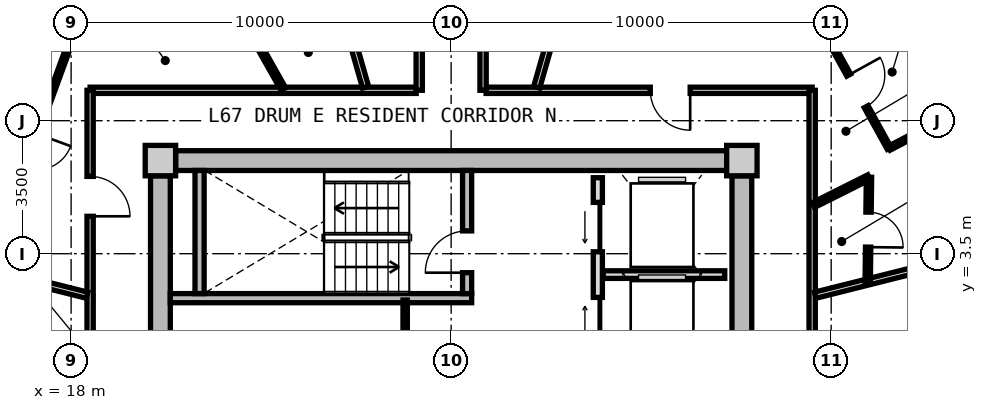
"""IFC4 building model, lengths in metres.
Left out: names, types, materials, properties, quantities, classifications, styles, units other than length and angle.
Written with IfcOpenShell. Run it as: python <this file> out.ifc"""

import sys

from ifc_helpers import new_model, si_unit, direction, frame, frame_2d, origin, origin_2d, place, context, subcontext, project, spatial, rectangle, extrude, source, transform, mapped, element, fill, save


model = new_model("IFC4")
c1 = context("Model", 3, precision=1e-05, world=origin(), true_north=direction((0.0, 1.0)))
c2 = subcontext(c1, "Body", "Model", "MODEL_VIEW")
j1 = project(units=[si_unit("LENGTHUNIT", "METRE"), si_unit("PLANEANGLEUNIT", "RADIAN")], contexts=[c1])
p1 = place(None, origin())
s1 = spatial("IfcSite", under=j1, at=p1, CompositionType="ELEMENT")
p2 = place(p1, origin())
s2 = spatial("IfcBuilding", under=s1, at=p2, CompositionType="ELEMENT")
p3 = place(p2, frame((0.0, 0.0, 216.95)))
s3 = spatial("IfcBuildingStorey", under=s2, at=p3, CompositionType="ELEMENT", Elevation=216.95)
m1 = source(origin(), c2, "Body", "SweptSolid", [
    extrude(rectangle(XDim=0.8, YDim=0.8, at=origin_2d()), origin(), (0.0, 0.0, 1.0), 3.05),
])
for number, where, z_axis, x_axis in (
    (1, (35.65, 5.95, 0.0), (0.0, 0.0, 1.0), (1.0, 0.0, 0.0)),
    (2, (20.35, 5.95, 0.0), (0.0, 0.0, 1.0), (1.0, 0.0, 0.0)),
):
    element("IfcColumn", number, at=place(p3, frame(where, z_axis=z_axis, x_axis=x_axis)), inside=s3, PredefinedType="COLUMN", context=c2, shape_type="MappedRepresentation", body=[
        mapped(m1, transform((0.0, 0.0, 0.0), x_axis=(1.0, 0.0, 0.0), y_axis=(0.0, 1.0, 0.0), z_axis=(0.0, 0.0, 1.0), scale=1.0)),
    ])
m2 = source(origin(), c2, "Body", "SweptSolid", [
    extrude(rectangle(XDim=14.5, YDim=0.52, at=frame_2d((7.25, 0.0))), origin(), (0.0, 0.0, 1.0), 2.76),
])
p4 = place(p3, frame((20.75, 5.95, 0.0), z_axis=(0.0, 0.0, 1.0), x_axis=(1.0, 0.0, 0.0)))
e3 = element("IfcWall", 3, at=p4, inside=s3, PredefinedType="SHEAR", context=c2, shape_type="MappedRepresentation", body=[
    mapped(m2, transform((0.0, 0.0, 0.0), x_axis=(1.0, 0.0, 0.0), y_axis=(0.0, 1.0, 0.0), z_axis=(0.0, 0.0, 1.0), scale=1.0)),
])
m3 = source(origin(), c2, "Body", "SweptSolid", [
    extrude(rectangle(XDim=11.1, YDim=0.52, at=frame_2d((5.55, 0.0))), origin(), (0.0, 0.0, 1.0), 2.76),
])
p5 = place(p3, frame((20.35, -5.55, 0.0), z_axis=(0.0, 0.0, 1.0), x_axis=(0.0, 1.0, 0.0)))
e4 = element("IfcWall", 4, at=p5, inside=s3, PredefinedType="SHEAR", context=c2, shape_type="MappedRepresentation", body=[
    mapped(m3, transform((0.0, 0.0, 0.0), x_axis=(1.0, 0.0, 0.0), y_axis=(0.0, 1.0, 0.0), z_axis=(0.0, 0.0, 1.0), scale=1.0)),
])
p6 = place(p5, frame((3.8, 0.0, 0.0)))
e5 = element("IfcOpeningElement", 5, at=p6, cuts=e4, PredefinedType="OPENING", context=c2, shape_type="SweptSolid", body=[
    extrude(rectangle(XDim=1.2, YDim=2.15, at=frame_2d((0.6, 1.075))), frame((0.0, 0.27, 0.0), z_axis=(0.0, -1.0, 0.0), x_axis=(1.0, 0.0, 0.0)), (0.0, 0.0, 1.0), 0.54),
])
p7 = place(p3, frame((35.65, 5.55, 0.0), z_axis=(0.0, 0.0, 1.0), x_axis=(0.0, -1.0, 0.0)))
e6 = element("IfcWall", 6, at=p7, inside=s3, PredefinedType="SHEAR", context=c2, shape_type="MappedRepresentation", body=[
    mapped(m3, transform((0.0, 0.0, 0.0), x_axis=(1.0, 0.0, 0.0), y_axis=(0.0, 1.0, 0.0), z_axis=(0.0, 0.0, 1.0), scale=1.0)),
])
p8 = place(p7, frame((5.65, 0.0, 0.0)))
e7 = element("IfcOpeningElement", 7, at=p8, cuts=e6, PredefinedType="OPENING", context=c2, shape_type="SweptSolid", body=[
    extrude(rectangle(XDim=1.2, YDim=2.15, at=frame_2d((0.6, 1.075))), frame((0.0, 0.27, 0.0), z_axis=(0.0, -1.0, 0.0), x_axis=(1.0, 0.0, 0.0)), (0.0, 0.0, 1.0), 0.54),
])
m4 = source(origin(), c2, "Body", "SweptSolid", [
    extrude(rectangle(XDim=7.93, YDim=0.24, at=frame_2d((3.965, 0.0))), origin(), (0.0, 0.0, 1.0), 2.76),
])
p9 = place(p3, frame((20.61, 2.33, 0.0), z_axis=(0.0, 0.0, 1.0), x_axis=(1.0, 0.0, 0.0)))
e8 = element("IfcWall", 8, at=p9, inside=s3, PredefinedType="PARTITIONING", context=c2, shape_type="MappedRepresentation", body=[
    mapped(m4, transform((0.0, 0.0, 0.0), x_axis=(1.0, 0.0, 0.0), y_axis=(0.0, 1.0, 0.0), z_axis=(0.0, 0.0, 1.0), scale=1.0)),
])
m5 = source(origin(), c2, "Body", "SweptSolid", [
    extrude(rectangle(XDim=3.24, YDim=0.24, at=frame_2d((1.62, 0.0))), origin(), (0.0, 0.0, 1.0), 2.76),
])
p10 = place(p3, frame((21.38, 2.45, 0.0), z_axis=(0.0, 0.0, 1.0), x_axis=(0.0, 1.0, 0.0)))
e9 = element("IfcWall", 9, at=p10, inside=s3, PredefinedType="PARTITIONING", context=c2, shape_type="MappedRepresentation", body=[
    mapped(m5, transform((0.0, 0.0, 0.0), x_axis=(1.0, 0.0, 0.0), y_axis=(0.0, 1.0, 0.0), z_axis=(0.0, 0.0, 1.0), scale=1.0)),
])
p11 = place(p3, frame((28.42, 2.45, 0.0), z_axis=(0.0, 0.0, 1.0), x_axis=(0.0, 1.0, 0.0)))
e10 = element("IfcWall", 10, at=p11, inside=s3, PredefinedType="PARTITIONING", context=c2, shape_type="MappedRepresentation", body=[
    mapped(m5, transform((0.0, 0.0, 0.0), x_axis=(1.0, 0.0, 0.0), y_axis=(0.0, 1.0, 0.0), z_axis=(0.0, 0.0, 1.0), scale=1.0)),
])
p12 = place(p11, frame((0.55, 0.0, 0.0)))
e11 = element("IfcOpeningElement", 11, at=p12, cuts=e10, PredefinedType="OPENING", context=c2, shape_type="SweptSolid", body=[
    extrude(rectangle(XDim=1.1, YDim=2.15, at=frame_2d((0.55, 1.075))), frame((0.0, 0.13, 0.0), z_axis=(0.0, -1.0, 0.0), x_axis=(1.0, 0.0, 0.0)), (0.0, 0.0, 1.0), 0.26),
])
m6 = source(origin(), c2, "Body", "SweptSolid", [
    extrude(rectangle(XDim=5.0, YDim=0.24, at=frame_2d((2.5, 0.0))), origin(), (0.0, 0.0, 1.0), 2.745),
])
p13 = place(p3, frame((31.86, 0.5, 0.0), z_axis=(0.0, 0.0, 1.0), x_axis=(0.0, 1.0, 0.0)))
e12 = element("IfcWall", 12, at=p13, inside=s3, PredefinedType="PARTITIONING", context=c2, shape_type="MappedRepresentation", body=[
    mapped(m6, transform((0.0, 0.0, 0.0), x_axis=(1.0, 0.0, 0.0), y_axis=(0.0, 1.0, 0.0), z_axis=(0.0, 0.0, 1.0), scale=1.0)),
])
p14 = place(p13, frame((3.05, 0.0, 0.0)))
e13 = element("IfcOpeningElement", 13, at=p14, cuts=e12, PredefinedType="OPENING", context=c2, shape_type="SweptSolid", body=[
    extrude(rectangle(XDim=1.3, YDim=2.2, at=frame_2d((0.65, 1.1))), frame((0.0, 0.13, 0.0), z_axis=(0.0, -1.0, 0.0), x_axis=(1.0, 0.0, 0.0)), (0.0, 0.0, 1.0), 0.26),
])
p15 = place(p13, frame((0.55, 0.0, 0.0)))
e14 = element("IfcOpeningElement", 14, at=p15, cuts=e12, PredefinedType="OPENING", context=c2, shape_type="SweptSolid", body=[
    extrude(rectangle(XDim=1.3, YDim=2.2, at=frame_2d((0.65, 1.1))), frame((0.0, 0.13, 0.0), z_axis=(0.0, -1.0, 0.0), x_axis=(1.0, 0.0, 0.0)), (0.0, 0.0, 1.0), 0.26),
])
m7 = source(origin(), c2, "Body", "SweptSolid", [
    extrude(rectangle(XDim=3.2, YDim=0.2, at=frame_2d((1.6, 0.0))), origin(), (0.0, 0.0, 1.0), 2.745),
])
p16 = place(p3, frame((32.0, 2.95, 0.0), z_axis=(0.0, 0.0, 1.0), x_axis=(1.0, 0.0, 0.0)))
e15 = element("IfcWall", 15, at=p16, inside=s3, PredefinedType="PARTITIONING", context=c2, shape_type="MappedRepresentation", body=[
    mapped(m7, transform((0.0, 0.0, 0.0), x_axis=(1.0, 0.0, 0.0), y_axis=(0.0, 1.0, 0.0), z_axis=(0.0, 0.0, 1.0), scale=1.0)),
])
m8 = source(origin(), c2, "Body", "SweptSolid", [
    extrude(rectangle(XDim=2.33, YDim=0.115, at=frame_2d((1.165, 0.0))), origin(), (0.0, 0.0, 1.0), 2.745),
])
p17 = place(p3, frame((26.79, -0.05, 0.0), z_axis=(0.0, 0.0, 1.0), x_axis=(0.0, 1.0, 0.0)))
e16 = element("IfcWall", 16, at=p17, inside=s3, PredefinedType="PARTITIONING", context=c2, shape_type="MappedRepresentation", body=[
    mapped(m8, transform((0.0, 0.0, 0.0), x_axis=(1.0, 0.0, 0.0), y_axis=(0.0, 1.0, 0.0), z_axis=(0.0, 0.0, 1.0), scale=1.0)),
])
m9 = source(origin(), c2, "Body", "SweptSolid", [
    extrude(rectangle(XDim=8.58, YDim=0.165, at=frame_2d((4.29, 0.0))), origin(), (0.0, 0.0, 1.0), 2.745),
])
p18 = place(p3, frame((18.5, 7.8, 0.0), z_axis=(0.0, 0.0, 1.0), x_axis=(1.0, 0.0, 0.0)))
e17 = element("IfcWall", 17, at=p18, inside=s3, PredefinedType="PARTITIONING", context=c2, shape_type="MappedRepresentation", body=[
    mapped(m9, transform((0.0, 0.0, 0.0), x_axis=(1.0, 0.0, 0.0), y_axis=(0.0, 1.0, 0.0), z_axis=(0.0, 0.0, 1.0), scale=1.0)),
])
p19 = place(p3, frame((28.92, 7.8, 0.0), z_axis=(0.0, 0.0, 1.0), x_axis=(1.0, 0.0, 0.0)))
e18 = element("IfcWall", 18, at=p19, inside=s3, PredefinedType="PARTITIONING", context=c2, shape_type="MappedRepresentation", body=[
    mapped(m9, transform((0.0, 0.0, 0.0), x_axis=(1.0, 0.0, 0.0), y_axis=(0.0, 1.0, 0.0), z_axis=(0.0, 0.0, 1.0), scale=1.0)),
])
p20 = place(p19, frame((4.32, 0.0, 0.0)))
e19 = element("IfcOpeningElement", 19, at=p20, cuts=e18, PredefinedType="OPENING", context=c2, shape_type="SweptSolid", body=[
    extrude(rectangle(XDim=1.05, YDim=2.15, at=frame_2d((0.525, 1.075))), frame((0.0, 0.093, 0.0), z_axis=(0.0, -1.0, 0.0), x_axis=(1.0, 0.0, 0.0)), (0.0, 0.0, 1.0), 0.185),
])
m10 = source(origin(), c2, "Body", "SweptSolid", [
    extrude(rectangle(XDim=6.88, YDim=0.165, at=frame_2d((3.44, 0.0))), origin(), (0.0, 0.0, 1.0), 2.745),
])
p21 = place(p3, frame((18.5, 0.92, 0.0), z_axis=(0.0, 0.0, 1.0), x_axis=(0.0, 1.0, 0.0)))
e20 = element("IfcWall", 20, at=p21, inside=s3, PredefinedType="PARTITIONING", context=c2, shape_type="MappedRepresentation", body=[
    mapped(m10, transform((0.0, 0.0, 0.0), x_axis=(1.0, 0.0, 0.0), y_axis=(0.0, 1.0, 0.0), z_axis=(0.0, 0.0, 1.0), scale=1.0)),
])
p22 = place(p21, frame((3.564, 0.0, 0.0)))
e21 = element("IfcOpeningElement", 21, at=p22, cuts=e20, PredefinedType="OPENING", context=c2, shape_type="SweptSolid", body=[
    extrude(rectangle(XDim=1.05, YDim=2.15, at=frame_2d((0.525, 1.075))), frame((0.0, 0.093, 0.0), z_axis=(0.0, -1.0, 0.0), x_axis=(1.0, 0.0, 0.0)), (0.0, 0.0, 1.0), 0.185),
])
p23 = place(p3, frame((37.5, 7.8, 0.0), z_axis=(0.0, 0.0, 1.0), x_axis=(0.0, -1.0, 0.0)))
e22 = element("IfcWall", 22, at=p23, inside=s3, PredefinedType="PARTITIONING", context=c2, shape_type="MappedRepresentation", body=[
    mapped(m10, transform((0.0, 0.0, 0.0), x_axis=(1.0, 0.0, 0.0), y_axis=(0.0, 1.0, 0.0), z_axis=(0.0, 0.0, 1.0), scale=1.0)),
])
m11 = source(origin(), c2, "Body", "SweptSolid", [
    extrude(rectangle(XDim=6.974, YDim=0.165, at=frame_2d((3.487, 0.0))), origin(), (0.0, 0.0, 1.0), 2.345),
])
for number, where, z_axis, x_axis in (
    (23, (30.251, 7.88, 0.0), (0.0, 0.0, 1.0), (0.275, 0.962, 0.0)),
    (24, (25.749, 7.88, 0.0), (0.0, 0.0, 1.0), (-0.275, 0.962, 0.0)),
):
    element("IfcWall", number, at=place(p3, frame(where, z_axis=z_axis, x_axis=x_axis)), inside=s3, PredefinedType="PARTITIONING", context=c2, shape_type="MappedRepresentation", body=[
        mapped(m11, transform((0.0, 0.0, 0.0), x_axis=(1.0, 0.0, 0.0), y_axis=(0.0, 1.0, 0.0), z_axis=(0.0, 0.0, 1.0), scale=1.0)),
    ])
m12 = source(origin(), c2, "Body", "SweptSolid", [
    extrude(rectangle(XDim=6.157, YDim=0.165, at=frame_2d((3.079, 0.0))), origin(), (0.0, 0.0, 1.0), 2.345),
])
for number, where, z_axis, x_axis in (
    (25, (18.42, 2.407, 0.0), (0.0, 0.0, 1.0), (-0.97, 0.244, 0.0)),
    (26, (37.58, 2.407, 0.0), (0.0, 0.0, 1.0), (0.97, 0.244, 0.0)),
):
    element("IfcWall", number, at=place(p3, frame(where, z_axis=z_axis, x_axis=x_axis)), inside=s3, PredefinedType="PARTITIONING", context=c2, shape_type="MappedRepresentation", body=[
        mapped(m12, transform((0.0, 0.0, 0.0), x_axis=(1.0, 0.0, 0.0), y_axis=(0.0, 1.0, 0.0), z_axis=(0.0, 0.0, 1.0), scale=1.0)),
    ])
m13 = source(origin(), c2, "Body", "SweptSolid", [
    extrude(rectangle(XDim=6.835, YDim=0.165, at=frame_2d((3.418, 0.0))), origin(), (0.0, 0.0, 1.0), 2.745),
])
p24 = place(p3, frame((27.16, 7.8, 0.0), z_axis=(0.0, 0.0, 1.0), x_axis=(0.0, 1.0, 0.0)))
e27 = element("IfcWall", 27, at=p24, inside=s3, PredefinedType="PARTITIONING", context=c2, shape_type="MappedRepresentation", body=[
    mapped(m13, transform((0.0, 0.0, 0.0), x_axis=(1.0, 0.0, 0.0), y_axis=(0.0, 1.0, 0.0), z_axis=(0.0, 0.0, 1.0), scale=1.0)),
])
p25 = place(p24, frame((2.943, 0.0, 0.0)))
e28 = element("IfcOpeningElement", 28, at=p25, cuts=e27, PredefinedType="OPENING", context=c2, shape_type="SweptSolid", body=[
    extrude(rectangle(XDim=0.95, YDim=2.1, at=frame_2d((0.475, 1.05))), frame((0.0, 0.093, 0.0), z_axis=(0.0, -1.0, 0.0), x_axis=(1.0, 0.0, 0.0)), (0.0, 0.0, 1.0), 0.185),
])
p26 = place(p3, frame((28.84, 14.635, 0.0), z_axis=(0.0, 0.0, 1.0), x_axis=(0.0, -1.0, 0.0)))
e29 = element("IfcWall", 29, at=p26, inside=s3, PredefinedType="PARTITIONING", context=c2, shape_type="MappedRepresentation", body=[
    mapped(m13, transform((0.0, 0.0, 0.0), x_axis=(1.0, 0.0, 0.0), y_axis=(0.0, 1.0, 0.0), z_axis=(0.0, 0.0, 1.0), scale=1.0)),
])
p27 = place(p26, frame((2.943, 0.0, 0.0)))
e30 = element("IfcOpeningElement", 30, at=p27, cuts=e29, PredefinedType="OPENING", context=c2, shape_type="SweptSolid", body=[
    extrude(rectangle(XDim=0.95, YDim=2.1, at=frame_2d((0.475, 1.05))), frame((0.0, 0.093, 0.0), z_axis=(0.0, -1.0, 0.0), x_axis=(1.0, 0.0, 0.0)), (0.0, 0.0, 1.0), 0.185),
])
m14 = source(origin(), c2, "Body", "SweptSolid", [
    extrude(rectangle(XDim=1.638, YDim=0.14, at=frame_2d((0.819, 0.0))), origin(), (0.0, 0.0, 1.0), 2.745),
])
p28 = place(p3, frame((37.53, 4.778, 0.0), z_axis=(0.0, 0.0, 1.0), x_axis=(0.893919977945, 0.448226586707, 0.0)))
e31 = element("IfcWall", 31, at=p28, inside=s3, PredefinedType="PARTITIONING", context=c2, shape_type="MappedRepresentation", body=[
    mapped(m14, transform((0.0, 0.0, 0.0), x_axis=(1.0, 0.0, 0.0), y_axis=(0.0, 1.0, 0.0), z_axis=(0.0, 0.0, 1.0), scale=1.0)),
])
m15 = source(origin(), c2, "Body", "SweptSolid", [
    extrude(rectangle(XDim=2.759, YDim=0.14, at=frame_2d((1.379, 0.0))), origin(), (0.0, 0.0, 1.0), 2.745),
])
p29 = place(p3, frame((38.995, 5.513, 0.0), z_axis=(0.0, 0.0, 1.0), x_axis=(-0.01194710728, -0.999928630767, 0.0)))
e32 = element("IfcWall", 32, at=p29, inside=s3, PredefinedType="PARTITIONING", context=c2, shape_type="MappedRepresentation", body=[
    mapped(m15, transform((0.0, 0.0, 0.0), x_axis=(1.0, 0.0, 0.0), y_axis=(0.0, 1.0, 0.0), z_axis=(0.0, 0.0, 1.0), scale=1.0)),
])
p30 = place(p29, frame((0.919, 0.0, 0.0)))
e33 = element("IfcOpeningElement", 33, at=p30, cuts=e32, PredefinedType="OPENING", context=c2, shape_type="SweptSolid", body=[
    extrude(rectangle(XDim=0.92, YDim=2.1, at=frame_2d((0.46, 1.05))), frame((0.0, 0.08, 0.0), z_axis=(0.0, -1.0, 0.0), x_axis=(1.0, 0.0, 0.0)), (0.0, 0.0, 1.0), 0.16),
])
m16 = source(origin(), c2, "Body", "SweptSolid", [
    extrude(rectangle(XDim=2.193, YDim=0.115, at=frame_2d((1.097, 0.0))), origin(), (0.0, 0.0, 1.0), 2.745),
])
p31 = place(p3, frame((39.525, 6.275, 0.0), z_axis=(0.0, 0.0, 1.0), x_axis=(0.885783595046, 0.464098505435, 0.0)))
e34 = element("IfcWall", 34, at=p31, inside=s3, PredefinedType="PARTITIONING", context=c2, shape_type="MappedRepresentation", body=[
    mapped(m16, transform((0.0, 0.0, 0.0), x_axis=(1.0, 0.0, 0.0), y_axis=(0.0, 1.0, 0.0), z_axis=(0.0, 0.0, 1.0), scale=1.0)),
])
m17 = source(origin(), c2, "Body", "SweptSolid", [
    extrude(rectangle(XDim=3.45, YDim=0.115, at=frame_2d((1.725, 0.0))), origin(), (0.0, 0.0, 1.0), 2.745),
])
p32 = place(p3, frame((39.525, 6.275, 0.0), z_axis=(0.0, 0.0, 1.0), x_axis=(-0.483659007882, 0.875256513312, 0.0)))
e35 = element("IfcWall", 35, at=p32, inside=s3, PredefinedType="PARTITIONING", context=c2, shape_type="MappedRepresentation", body=[
    mapped(m17, transform((0.0, 0.0, 0.0), x_axis=(1.0, 0.0, 0.0), y_axis=(0.0, 1.0, 0.0), z_axis=(0.0, 0.0, 1.0), scale=1.0)),
])
p33 = place(p32, frame((1.25, 0.0, 0.0)))
e36 = element("IfcOpeningElement", 36, at=p33, cuts=e35, PredefinedType="OPENING", context=c2, shape_type="SweptSolid", body=[
    extrude(rectangle(XDim=0.95, YDim=2.1, at=frame_2d((0.475, 1.05))), frame((0.0, 0.067, 0.0), z_axis=(0.0, -1.0, 0.0), x_axis=(1.0, 0.0, 0.0)), (0.0, 0.0, 1.0), 0.135),
])
m18 = source(origin(), c2, "Body", "SweptSolid", [
    extrude(rectangle(XDim=6.69, YDim=0.115, at=frame_2d((3.345, 0.0))), origin(), (0.0, 0.0, 1.0), 2.745),
])
p34 = place(p3, frame((18.083, 9.352, 0.0), z_axis=(0.0, 0.0, 1.0), x_axis=(-0.343693784919, -0.939081776102, 0.0)))
e37 = element("IfcWall", 37, at=p34, inside=s3, PredefinedType="PARTITIONING", context=c2, shape_type="MappedRepresentation", body=[
    mapped(m18, transform((0.0, 0.0, 0.0), x_axis=(1.0, 0.0, 0.0), y_axis=(0.0, 1.0, 0.0), z_axis=(0.0, 0.0, 1.0), scale=1.0)),
])
p35 = place(p34, frame((2.87, 0.0, 0.0)))
e38 = element("IfcOpeningElement", 38, at=p35, cuts=e37, PredefinedType="OPENING", context=c2, shape_type="SweptSolid", body=[
    extrude(rectangle(XDim=0.95, YDim=2.1, at=frame_2d((0.475, 1.05))), frame((0.0, 0.067, 0.0), z_axis=(0.0, -1.0, 0.0), x_axis=(1.0, 0.0, 0.0)), (0.0, 0.0, 1.0), 0.135),
])
m19 = source(origin(), c2, "Body", "SweptSolid", [
    extrude(rectangle(XDim=2.035, YDim=0.14, at=frame_2d((1.018, 0.0))), origin(), (0.0, 0.0, 1.0), 2.745),
])
p36 = place(p3, frame((23.585, 7.83, 0.0), z_axis=(0.0, 0.0, 1.0), x_axis=(-0.491092509169, 0.871107425888, 0.0)))
e39 = element("IfcWall", 39, at=p36, inside=s3, PredefinedType="PARTITIONING", context=c2, shape_type="MappedRepresentation", body=[
    mapped(m19, transform((0.0, 0.0, 0.0), x_axis=(1.0, 0.0, 0.0), y_axis=(0.0, 1.0, 0.0), z_axis=(0.0, 0.0, 1.0), scale=1.0)),
])
m20 = source(origin(), c2, "Body", "SweptSolid", [
    extrude(rectangle(XDim=1.1, YDim=2.15, at=frame_2d((0.55, 1.075))), frame((0.0, 0.025, 0.0), z_axis=(0.0, -1.0, 0.0), x_axis=(1.0, 0.0, 0.0)), (0.0, 0.0, 1.0), 0.05),
])
p37 = place(p12, origin())
e40 = element("IfcDoor", 40, at=p37, inside=s3, OperationType="SINGLE_SWING_LEFT", PredefinedType="DOOR", context=c2, shape_type="MappedRepresentation", body=[
    mapped(m20, transform((0.0, 0.0, 0.0), x_axis=(1.0, 0.0, 0.0), y_axis=(0.0, 1.0, 0.0), z_axis=(0.0, 0.0, 1.0), scale=1.0)),
])
fill(e11, e40)
m21 = source(origin(), c2, "Body", "SweptSolid", [
    extrude(rectangle(XDim=1.3, YDim=2.2, at=frame_2d((0.65, 1.1))), frame((0.0, 0.025, 0.0), z_axis=(0.0, -1.0, 0.0), x_axis=(1.0, 0.0, 0.0)), (0.0, 0.0, 1.0), 0.05),
])
p38 = place(p14, origin())
e41 = element("IfcDoor", 41, at=p38, inside=s3, OperationType="SLIDING_TO_LEFT", PredefinedType="DOOR", context=c2, shape_type="MappedRepresentation", body=[
    mapped(m21, transform((0.0, 0.0, 0.0), x_axis=(1.0, 0.0, 0.0), y_axis=(0.0, 1.0, 0.0), z_axis=(0.0, 0.0, 1.0), scale=1.0)),
])
fill(e13, e41)
p39 = place(p15, origin())
e42 = element("IfcDoor", 42, at=p39, inside=s3, OperationType="SLIDING_TO_RIGHT", PredefinedType="DOOR", context=c2, shape_type="MappedRepresentation", body=[
    mapped(m21, transform((0.0, 0.0, 0.0), x_axis=(1.0, 0.0, 0.0), y_axis=(0.0, 1.0, 0.0), z_axis=(0.0, 0.0, 1.0), scale=1.0)),
])
fill(e14, e42)
m22 = source(origin(), c2, "Body", "SweptSolid", [
    extrude(rectangle(XDim=1.05, YDim=2.15, at=frame_2d((0.525, 1.075))), frame((0.0, 0.025, 0.0), z_axis=(0.0, -1.0, 0.0), x_axis=(1.0, 0.0, 0.0)), (0.0, 0.0, 1.0), 0.05),
])
p40 = place(p20, frame((1.05, 0.0, 0.0), z_axis=(0.0, 0.0, 1.0), x_axis=(-1.0, 0.0, 0.0)))
e43 = element("IfcDoor", 43, at=p40, inside=s3, OperationType="SINGLE_SWING_LEFT", PredefinedType="DOOR", context=c2, shape_type="MappedRepresentation", body=[
    mapped(m22, transform((0.0, 0.0, 0.0), x_axis=(1.0, 0.0, 0.0), y_axis=(0.0, 1.0, 0.0), z_axis=(0.0, 0.0, 1.0), scale=1.0)),
])
fill(e19, e43)
m23 = source(origin(), c2, "Body", "SweptSolid", [
    extrude(rectangle(XDim=0.92, YDim=2.1, at=frame_2d((0.46, 1.05))), frame((0.0, 0.025, 0.0), z_axis=(0.0, -1.0, 0.0), x_axis=(1.0, 0.0, 0.0)), (0.0, 0.0, 1.0), 0.05),
])
p41 = place(p30, origin())
e44 = element("IfcDoor", 44, at=p41, inside=s3, OperationType="SINGLE_SWING_RIGHT", PredefinedType="DOOR", context=c2, shape_type="MappedRepresentation", body=[
    mapped(m23, transform((0.0, 0.0, 0.0), x_axis=(1.0, 0.0, 0.0), y_axis=(0.0, 1.0, 0.0), z_axis=(0.0, 0.0, 1.0), scale=1.0)),
])
fill(e33, e44)
m24 = source(origin(), c2, "Body", "SweptSolid", [
    extrude(rectangle(XDim=0.95, YDim=2.1, at=frame_2d((0.475, 1.05))), frame((0.0, 0.025, 0.0), z_axis=(0.0, -1.0, 0.0), x_axis=(1.0, 0.0, 0.0)), (0.0, 0.0, 1.0), 0.05),
])
p42 = place(p33, frame((0.95, 0.0, 0.0), z_axis=(0.0, 0.0, 1.0), x_axis=(-1.0, 0.0, 0.0)))
e45 = element("IfcDoor", 45, at=p42, inside=s3, OperationType="SINGLE_SWING_LEFT", PredefinedType="DOOR", context=c2, shape_type="MappedRepresentation", body=[
    mapped(m24, transform((0.0, 0.0, 0.0), x_axis=(1.0, 0.0, 0.0), y_axis=(0.0, 1.0, 0.0), z_axis=(0.0, 0.0, 1.0), scale=1.0)),
])
fill(e36, e45)
p43 = place(p22, frame((1.05, 0.0, 0.0), z_axis=(0.0, 0.0, 1.0), x_axis=(-1.0, 0.0, 0.0)))
e46 = element("IfcDoor", 46, at=p43, inside=s3, OperationType="SINGLE_SWING_RIGHT", PredefinedType="DOOR", context=c2, shape_type="MappedRepresentation", body=[
    mapped(m22, transform((0.0, 0.0, 0.0), x_axis=(1.0, 0.0, 0.0), y_axis=(0.0, 1.0, 0.0), z_axis=(0.0, 0.0, 1.0), scale=1.0)),
])
fill(e21, e46)
save(model, sys.argv[1])
